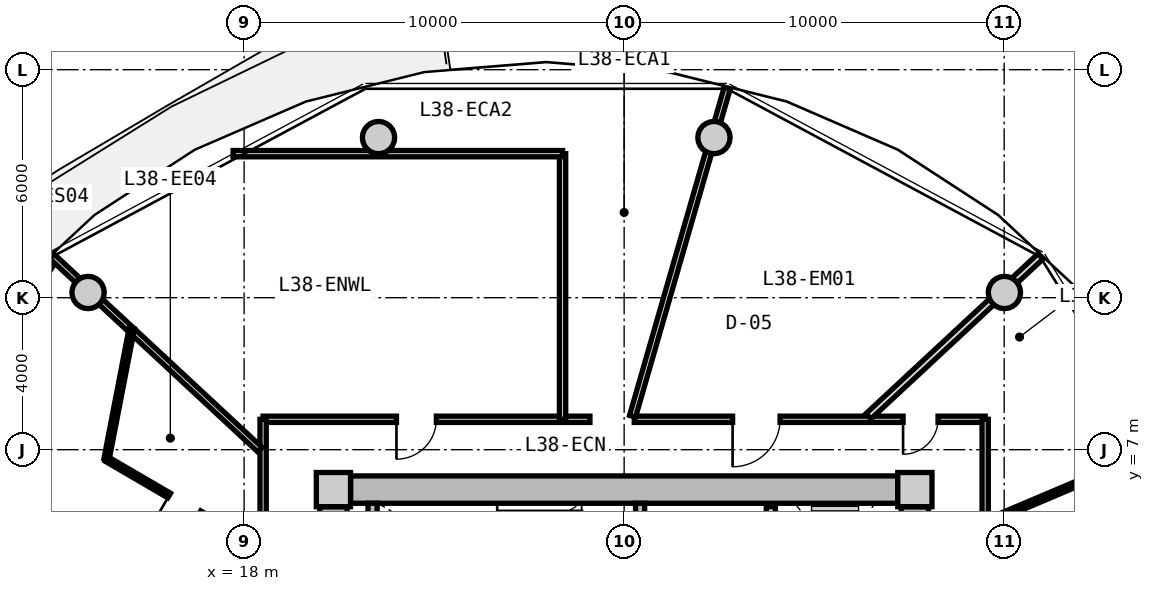
"""IFC4 building model, lengths in metres.
Left out: names, types, materials, properties, quantities, classifications, styles, units other than length and angle.
Written with IfcOpenShell. Run it as: python <this file> out.ifc"""

import sys

from ifc_helpers import new_model, si_unit, direction, frame, frame_2d, origin, origin_2d, place, context, subcontext, project, spatial, rectangle, circle, extrude, source, transform, mapped, element, fill, save


model = new_model("IFC4")
c1 = context("Model", 3, precision=1e-05, world=origin(), true_north=direction((0.0, 1.0)))
c2 = subcontext(c1, "Body", "Model", "MODEL_VIEW")
j1 = project(units=[si_unit("LENGTHUNIT", "METRE"), si_unit("PLANEANGLEUNIT", "RADIAN")], contexts=[c1])
p1 = place(None, origin())
s1 = spatial("IfcSite", under=j1, at=p1, CompositionType="ELEMENT")
p2 = place(p1, origin())
s2 = spatial("IfcBuilding", under=s1, at=p2, CompositionType="ELEMENT")
p3 = place(p2, frame((0.0, 0.0, 123.7)))
s3 = spatial("IfcBuildingStorey", under=s2, at=p3, CompositionType="ELEMENT", Elevation=123.7)
m1 = source(origin(), c2, "Body", "SweptSolid", [
    extrude(rectangle(XDim=0.9, YDim=0.9, at=origin_2d()), origin(), (0.0, 0.0, 1.0), 3.05),
])
for number, where, z_axis, x_axis in (
    (1, (35.65, 5.95, 0.0), (0.0, 0.0, 1.0), (1.0, 0.0, 0.0)),
    (2, (20.35, 5.95, 0.0), (0.0, 0.0, 1.0), (1.0, 0.0, 0.0)),
):
    element("IfcColumn", number, at=place(p3, frame(where, z_axis=z_axis, x_axis=x_axis)), inside=s3, PredefinedType="COLUMN", context=c2, shape_type="MappedRepresentation", body=[
        mapped(m1, transform((0.0, 0.0, 0.0), x_axis=(1.0, 0.0, 0.0), y_axis=(0.0, 1.0, 0.0), z_axis=(0.0, 0.0, 1.0), scale=1.0)),
    ])
m2 = source(origin(), c2, "Body", "SweptSolid", [
    extrude(rectangle(XDim=14.4, YDim=0.72, at=frame_2d((7.2, 0.0))), origin(), (0.0, 0.0, 1.0), 2.79),
])
p4 = place(p3, frame((20.8, 5.95, 0.0), z_axis=(0.0, 0.0, 1.0), x_axis=(1.0, 0.0, 0.0)))
e3 = element("IfcWall", 3, at=p4, inside=s3, PredefinedType="SHEAR", context=c2, shape_type="MappedRepresentation", body=[
    mapped(m2, transform((0.0, 0.0, 0.0), x_axis=(1.0, 0.0, 0.0), y_axis=(0.0, 1.0, 0.0), z_axis=(0.0, 0.0, 1.0), scale=1.0)),
])
m3 = source(origin(), c2, "Body", "SweptSolid", [
    extrude(rectangle(XDim=11.0, YDim=0.72, at=frame_2d((5.5, 0.0))), origin(), (0.0, 0.0, 1.0), 2.79),
])
p5 = place(p3, frame((20.35, -5.5, 0.0), z_axis=(0.0, 0.0, 1.0), x_axis=(0.0, 1.0, 0.0)))
e4 = element("IfcWall", 4, at=p5, inside=s3, PredefinedType="SHEAR", context=c2, shape_type="MappedRepresentation", body=[
    mapped(m3, transform((0.0, 0.0, 0.0), x_axis=(1.0, 0.0, 0.0), y_axis=(0.0, 1.0, 0.0), z_axis=(0.0, 0.0, 1.0), scale=1.0)),
])
p6 = place(p5, frame((3.8, 0.0, 0.0)))
e5 = element("IfcOpeningElement", 5, at=p6, cuts=e4, PredefinedType="OPENING", context=c2, shape_type="SweptSolid", body=[
    extrude(rectangle(XDim=1.2, YDim=2.15, at=frame_2d((0.6, 1.075))), frame((0.0, 0.37, 0.0), z_axis=(0.0, -1.0, 0.0), x_axis=(1.0, 0.0, 0.0)), (0.0, 0.0, 1.0), 0.74),
])
p7 = place(p3, frame((35.65, 5.5, 0.0), z_axis=(0.0, 0.0, 1.0), x_axis=(0.0, -1.0, 0.0)))
e6 = element("IfcWall", 6, at=p7, inside=s3, PredefinedType="SHEAR", context=c2, shape_type="MappedRepresentation", body=[
    mapped(m3, transform((0.0, 0.0, 0.0), x_axis=(1.0, 0.0, 0.0), y_axis=(0.0, 1.0, 0.0), z_axis=(0.0, 0.0, 1.0), scale=1.0)),
])
p8 = place(p7, frame((5.65, 0.0, 0.0)))
e7 = element("IfcOpeningElement", 7, at=p8, cuts=e6, PredefinedType="OPENING", context=c2, shape_type="SweptSolid", body=[
    extrude(rectangle(XDim=1.2, YDim=2.15, at=frame_2d((0.6, 1.075))), frame((0.0, 0.37, 0.0), z_axis=(0.0, -1.0, 0.0), x_axis=(1.0, 0.0, 0.0)), (0.0, 0.0, 1.0), 0.74),
])
m4 = source(origin(), c2, "Body", "SweptSolid", [
    extrude(circle(Radius=0.425, at=origin_2d()), origin(), (0.0, 0.0, 1.0), 3.05),
])
for number, where, z_axis, x_axis in (
    (8, (38.006, 11.137, 0.0), (0.0, 0.0, 1.0), (1.0, 0.0, 0.0)),
    (9, (30.363, 15.213, 0.0), (0.0, 0.0, 1.0), (1.0, 0.0, 0.0)),
    (10, (21.537, 15.213, 0.0), (0.0, 0.0, 1.0), (1.0, 0.0, 0.0)),
    (11, (13.894, 11.137, 0.0), (0.0, 0.0, 1.0), (1.0, 0.0, 0.0)),
):
    element("IfcColumn", number, at=place(p3, frame(where, z_axis=z_axis, x_axis=x_axis)), inside=s3, PredefinedType="COLUMN", context=c2, shape_type="MappedRepresentation", body=[
        mapped(m4, transform((0.0, 0.0, 0.0), x_axis=(1.0, 0.0, 0.0), y_axis=(0.0, 1.0, 0.0), z_axis=(0.0, 0.0, 1.0), scale=1.0)),
    ])
m5 = source(origin(), c2, "Body", "SweptSolid", [
    extrude(rectangle(XDim=9.014, YDim=0.29, at=frame_2d((4.507, 0.0))), origin(), (0.0, 0.0, 1.0), 2.79),
])
p9 = place(p3, frame((8.196, 4.421, 0.0), z_axis=(0.0, 0.0, 1.0), x_axis=(0.527732945084, 0.849410347637, 0.0)))
e12 = element("IfcWall", 12, at=p9, inside=s3, PredefinedType="SOLIDWALL", context=c2, shape_type="MappedRepresentation", body=[
    mapped(m5, transform((0.0, 0.0, 0.0), x_axis=(1.0, 0.0, 0.0), y_axis=(0.0, 1.0, 0.0), z_axis=(0.0, 0.0, 1.0), scale=1.0)),
])
p10 = place(p9, frame((0.98, 0.0, 0.0)))
e13 = element("IfcOpeningElement", 13, at=p10, cuts=e12, PredefinedType="OPENING", context=c2, shape_type="SweptSolid", body=[
    extrude(rectangle(XDim=1.15, YDim=2.25, at=frame_2d((0.575, 1.125))), frame((0.0, 0.155, 0.0), z_axis=(0.0, -1.0, 0.0), x_axis=(1.0, 0.0, 0.0)), (0.0, 0.0, 1.0), 0.31),
])
p11 = place(p9, frame((4.857, 0.0, 0.85)))
e14 = element("IfcOpeningElement", 14, at=p11, cuts=e12, PredefinedType="OPENING", context=c2, shape_type="SweptSolid", body=[
    extrude(rectangle(XDim=1.2, YDim=1.5, at=frame_2d((0.6, 0.75))), frame((0.0, 0.155, 0.0), z_axis=(0.0, -1.0, 0.0), x_axis=(1.0, 0.0, 0.0)), (0.0, 0.0, 1.0), 0.31),
])
m6 = source(origin(), c2, "Body", "SweptSolid", [
    extrude(rectangle(XDim=3.14, YDim=0.24, at=frame_2d((1.57, 0.0))), origin(), (0.0, 0.0, 1.0), 2.79),
])
p12 = place(p3, frame((21.38, 2.45, 0.0), z_axis=(0.0, 0.0, 1.0), x_axis=(0.0, 1.0, 0.0)))
e15 = element("IfcWall", 15, at=p12, inside=s3, PredefinedType="PARTITIONING", context=c2, shape_type="MappedRepresentation", body=[
    mapped(m6, transform((0.0, 0.0, 0.0), x_axis=(1.0, 0.0, 0.0), y_axis=(0.0, 1.0, 0.0), z_axis=(0.0, 0.0, 1.0), scale=1.0)),
])
p13 = place(p3, frame((28.42, 2.45, 0.0), z_axis=(0.0, 0.0, 1.0), x_axis=(0.0, 1.0, 0.0)))
e16 = element("IfcWall", 16, at=p13, inside=s3, PredefinedType="PARTITIONING", context=c2, shape_type="MappedRepresentation", body=[
    mapped(m6, transform((0.0, 0.0, 0.0), x_axis=(1.0, 0.0, 0.0), y_axis=(0.0, 1.0, 0.0), z_axis=(0.0, 0.0, 1.0), scale=1.0)),
])
p14 = place(p13, frame((0.55, 0.0, 0.0)))
e17 = element("IfcOpeningElement", 17, at=p14, cuts=e16, PredefinedType="OPENING", context=c2, shape_type="SweptSolid", body=[
    extrude(rectangle(XDim=1.1, YDim=2.15, at=frame_2d((0.55, 1.075))), frame((0.0, 0.13, 0.0), z_axis=(0.0, -1.0, 0.0), x_axis=(1.0, 0.0, 0.0)), (0.0, 0.0, 1.0), 0.26),
])
m7 = source(origin(), c2, "Body", "SweptSolid", [
    extrude(rectangle(XDim=5.0, YDim=0.24, at=frame_2d((2.5, 0.0))), origin(), (0.0, 0.0, 1.0), 2.775),
])
p15 = place(p3, frame((31.86, 0.5, 0.0), z_axis=(0.0, 0.0, 1.0), x_axis=(0.0, 1.0, 0.0)))
e18 = element("IfcWall", 18, at=p15, inside=s3, PredefinedType="PARTITIONING", context=c2, shape_type="MappedRepresentation", body=[
    mapped(m7, transform((0.0, 0.0, 0.0), x_axis=(1.0, 0.0, 0.0), y_axis=(0.0, 1.0, 0.0), z_axis=(0.0, 0.0, 1.0), scale=1.0)),
])
p16 = place(p15, frame((3.05, 0.0, 0.0)))
e19 = element("IfcOpeningElement", 19, at=p16, cuts=e18, PredefinedType="OPENING", context=c2, shape_type="SweptSolid", body=[
    extrude(rectangle(XDim=1.3, YDim=2.2, at=frame_2d((0.65, 1.1))), frame((0.0, 0.13, 0.0), z_axis=(0.0, -1.0, 0.0), x_axis=(1.0, 0.0, 0.0)), (0.0, 0.0, 1.0), 0.26),
])
p17 = place(p15, frame((0.55, 0.0, 0.0)))
e20 = element("IfcOpeningElement", 20, at=p17, cuts=e18, PredefinedType="OPENING", context=c2, shape_type="SweptSolid", body=[
    extrude(rectangle(XDim=1.3, YDim=2.2, at=frame_2d((0.65, 1.1))), frame((0.0, 0.13, 0.0), z_axis=(0.0, -1.0, 0.0), x_axis=(1.0, 0.0, 0.0)), (0.0, 0.0, 1.0), 0.26),
])
m8 = source(origin(), c2, "Body", "SweptSolid", [
    extrude(rectangle(XDim=8.6, YDim=0.165, at=frame_2d((4.3, 0.0))), origin(), (0.0, 0.0, 1.0), 2.775),
])
p18 = place(p3, frame((18.5, 7.8, 0.0), z_axis=(0.0, 0.0, 1.0), x_axis=(1.0, 0.0, 0.0)))
e21 = element("IfcWall", 21, at=p18, inside=s3, PredefinedType="PARTITIONING", context=c2, shape_type="MappedRepresentation", body=[
    mapped(m8, transform((0.0, 0.0, 0.0), x_axis=(1.0, 0.0, 0.0), y_axis=(0.0, 1.0, 0.0), z_axis=(0.0, 0.0, 1.0), scale=1.0)),
])
p19 = place(p18, frame((3.509, 0.0, 0.0)))
e22 = element("IfcOpeningElement", 22, at=p19, cuts=e21, PredefinedType="OPENING", context=c2, shape_type="SweptSolid", body=[
    extrude(rectangle(XDim=1.05, YDim=2.15, at=frame_2d((0.525, 1.075))), frame((0.0, 0.093, 0.0), z_axis=(0.0, -1.0, 0.0), x_axis=(1.0, 0.0, 0.0)), (0.0, 0.0, 1.0), 0.185),
])
m9 = source(origin(), c2, "Body", "SweptSolid", [
    extrude(rectangle(XDim=9.234, YDim=0.165, at=frame_2d((4.617, 0.0))), origin(), (0.0, 0.0, 1.0), 2.775),
])
p20 = place(p3, frame((28.266, 7.8, 0.0), z_axis=(0.0, 0.0, 1.0), x_axis=(1.0, 0.0, 0.0)))
e23 = element("IfcWall", 23, at=p20, inside=s3, PredefinedType="PARTITIONING", context=c2, shape_type="MappedRepresentation", body=[
    mapped(m9, transform((0.0, 0.0, 0.0), x_axis=(1.0, 0.0, 0.0), y_axis=(0.0, 1.0, 0.0), z_axis=(0.0, 0.0, 1.0), scale=1.0)),
])
p21 = place(p20, frame((7.074, 0.0, 0.0)))
e24 = element("IfcOpeningElement", 24, at=p21, cuts=e23, PredefinedType="OPENING", context=c2, shape_type="SweptSolid", body=[
    extrude(rectangle(XDim=0.92, YDim=2.1, at=frame_2d((0.46, 1.05))), frame((0.0, 0.093, 0.0), z_axis=(0.0, -1.0, 0.0), x_axis=(1.0, 0.0, 0.0)), (0.0, 0.0, 1.0), 0.185),
])
p22 = place(p20, frame((2.588, 0.0, 0.0)))
e25 = element("IfcOpeningElement", 25, at=p22, cuts=e23, PredefinedType="OPENING", context=c2, shape_type="SweptSolid", body=[
    extrude(rectangle(XDim=1.25, YDim=2.2, at=frame_2d((0.625, 1.1))), frame((0.0, 0.093, 0.0), z_axis=(0.0, -1.0, 0.0), x_axis=(1.0, 0.0, 0.0)), (0.0, 0.0, 1.0), 0.185),
])
m10 = source(origin(), c2, "Body", "SweptSolid", [
    extrude(rectangle(XDim=15.6, YDim=0.165, at=frame_2d((7.8, 0.0))), origin(), (0.0, 0.0, 1.0), 2.775),
])
p23 = place(p3, frame((18.5, -7.8, 0.0), z_axis=(0.0, 0.0, 1.0), x_axis=(0.0, 1.0, 0.0)))
e26 = element("IfcWall", 26, at=p23, inside=s3, PredefinedType="PARTITIONING", context=c2, shape_type="MappedRepresentation", body=[
    mapped(m10, transform((0.0, 0.0, 0.0), x_axis=(1.0, 0.0, 0.0), y_axis=(0.0, 1.0, 0.0), z_axis=(0.0, 0.0, 1.0), scale=1.0)),
])
p24 = place(p23, frame((10.383, 0.0, 0.0)))
e27 = element("IfcOpeningElement", 27, at=p24, cuts=e26, PredefinedType="OPENING", context=c2, shape_type="SweptSolid", body=[
    extrude(rectangle(XDim=1.05, YDim=2.15, at=frame_2d((0.525, 1.075))), frame((0.0, 0.093, 0.0), z_axis=(0.0, -1.0, 0.0), x_axis=(1.0, 0.0, 0.0)), (0.0, 0.0, 1.0), 0.185),
])
p25 = place(p23, frame((6.419, 0.0, 0.0)))
e28 = element("IfcOpeningElement", 28, at=p25, cuts=e26, PredefinedType="OPENING", context=c2, shape_type="SweptSolid", body=[
    extrude(rectangle(XDim=1.05, YDim=2.15, at=frame_2d((0.525, 1.075))), frame((0.0, 0.093, 0.0), z_axis=(0.0, -1.0, 0.0), x_axis=(1.0, 0.0, 0.0)), (0.0, 0.0, 1.0), 0.185),
])
p26 = place(p3, frame((37.5, 7.8, 0.0), z_axis=(0.0, 0.0, 1.0), x_axis=(0.0, -1.0, 0.0)))
e29 = element("IfcWall", 29, at=p26, inside=s3, PredefinedType="PARTITIONING", context=c2, shape_type="MappedRepresentation", body=[
    mapped(m10, transform((0.0, 0.0, 0.0), x_axis=(1.0, 0.0, 0.0), y_axis=(0.0, 1.0, 0.0), z_axis=(0.0, 0.0, 1.0), scale=1.0)),
])
p27 = place(p26, frame((12.094, 0.0, 0.0)))
e30 = element("IfcOpeningElement", 30, at=p27, cuts=e29, PredefinedType="OPENING", context=c2, shape_type="SweptSolid", body=[
    extrude(rectangle(XDim=1.05, YDim=2.15, at=frame_2d((0.525, 1.075))), frame((0.0, 0.093, 0.0), z_axis=(0.0, -1.0, 0.0), x_axis=(1.0, 0.0, 0.0)), (0.0, 0.0, 1.0), 0.185),
])
p28 = place(p26, frame((5.971, 0.0, 0.0)))
e31 = element("IfcOpeningElement", 31, at=p28, cuts=e29, PredefinedType="OPENING", context=c2, shape_type="SweptSolid", body=[
    extrude(rectangle(XDim=1.05, YDim=2.15, at=frame_2d((0.525, 1.075))), frame((0.0, 0.093, 0.0), z_axis=(0.0, -1.0, 0.0), x_axis=(1.0, 0.0, 0.0)), (0.0, 0.0, 1.0), 0.185),
])
p29 = place(p26, frame((3.324, 0.0, 0.0)))
e32 = element("IfcOpeningElement", 32, at=p29, cuts=e29, PredefinedType="OPENING", context=c2, shape_type="SweptSolid", body=[
    extrude(rectangle(XDim=0.92, YDim=2.1, at=frame_2d((0.46, 1.05))), frame((0.0, 0.093, 0.0), z_axis=(0.0, -1.0, 0.0), x_axis=(1.0, 0.0, 0.0)), (0.0, 0.0, 1.0), 0.185),
])
m11 = source(origin(), c2, "Body", "SweptSolid", [
    extrude(rectangle(XDim=8.989, YDim=0.165, at=frame_2d((4.495, 0.0))), origin(), (0.0, 0.0, 1.0), 2.275),
])
p30 = place(p3, frame((28.222, 7.88, 0.0), z_axis=(0.0, 0.0, 1.0), x_axis=(0.27702323008, 0.960863221274, 0.0)))
e33 = element("IfcWall", 33, at=p30, inside=s3, PredefinedType="PARTITIONING", context=c2, shape_type="MappedRepresentation", body=[
    mapped(m11, transform((0.0, 0.0, 0.0), x_axis=(1.0, 0.0, 0.0), y_axis=(0.0, 1.0, 0.0), z_axis=(0.0, 0.0, 1.0), scale=1.0)),
])
m12 = source(origin(), c2, "Body", "SweptSolid", [
    extrude(rectangle(XDim=7.482, YDim=0.165, at=frame_2d((3.741, 0.0))), origin(), (0.0, 0.0, 1.0), 2.275),
])
p31 = place(p3, frame((18.42, 6.998, 0.0), z_axis=(0.0, 0.0, 1.0), x_axis=(-0.732508698043, 0.680757671489, 0.0)))
e34 = element("IfcWall", 34, at=p31, inside=s3, PredefinedType="PARTITIONING", context=c2, shape_type="MappedRepresentation", body=[
    mapped(m12, transform((0.0, 0.0, 0.0), x_axis=(1.0, 0.0, 0.0), y_axis=(0.0, 1.0, 0.0), z_axis=(0.0, 0.0, 1.0), scale=1.0)),
])
m13 = source(origin(), c2, "Body", "SweptSolid", [
    extrude(rectangle(XDim=6.99, YDim=0.165, at=frame_2d((3.495, 0.0))), origin(), (0.0, 0.0, 1.0), 2.775),
])
p32 = place(p3, frame((26.38, 7.8, 0.0), z_axis=(0.0, 0.0, 1.0), x_axis=(0.0, 1.0, 0.0)))
e35 = element("IfcWall", 35, at=p32, inside=s3, PredefinedType="PARTITIONING", context=c2, shape_type="MappedRepresentation", body=[
    mapped(m13, transform((0.0, 0.0, 0.0), x_axis=(1.0, 0.0, 0.0), y_axis=(0.0, 1.0, 0.0), z_axis=(0.0, 0.0, 1.0), scale=1.0)),
])
m14 = source(origin(), c2, "Body", "SweptSolid", [
    extrude(rectangle(XDim=8.669, YDim=0.165, at=frame_2d((4.335, 0.0))), origin(), (0.0, 0.0, 1.0), 2.775),
])
p33 = place(p3, frame((17.71, 14.79, 0.0), z_axis=(0.0, 0.0, 1.0), x_axis=(1.0, 0.0, 0.0)))
e36 = element("IfcWall", 36, at=p33, inside=s3, PredefinedType="PARTITIONING", context=c2, shape_type="MappedRepresentation", body=[
    mapped(m14, transform((0.0, 0.0, 0.0), x_axis=(1.0, 0.0, 0.0), y_axis=(0.0, 1.0, 0.0), z_axis=(0.0, 0.0, 1.0), scale=1.0)),
])
m15 = source(origin(), c2, "Body", "SweptSolid", [
    extrude(rectangle(XDim=4.735, YDim=0.14, at=frame_2d((2.368, 0.0))), origin(), (0.0, 0.0, 1.0), 2.775),
])
p34 = place(p3, frame((18.47, 4.368, 0.0), z_axis=(0.0, 0.0, 1.0), x_axis=(-0.863537576642, 0.504284496814, 0.0)))
e37 = element("IfcWall", 37, at=p34, inside=s3, PredefinedType="PARTITIONING", context=c2, shape_type="MappedRepresentation", body=[
    mapped(m15, transform((0.0, 0.0, 0.0), x_axis=(1.0, 0.0, 0.0), y_axis=(0.0, 1.0, 0.0), z_axis=(0.0, 0.0, 1.0), scale=1.0)),
])
p35 = place(p34, frame((1.908, 0.0, 0.0)))
e38 = element("IfcOpeningElement", 38, at=p35, cuts=e37, PredefinedType="OPENING", context=c2, shape_type="SweptSolid", body=[
    extrude(rectangle(XDim=0.92, YDim=2.1, at=frame_2d((0.46, 1.05))), frame((0.0, 0.08, 0.0), z_axis=(0.0, -1.0, 0.0), x_axis=(1.0, 0.0, 0.0)), (0.0, 0.0, 1.0), 0.16),
])
m16 = source(origin(), c2, "Body", "SweptSolid", [
    extrude(rectangle(XDim=3.499, YDim=0.14, at=frame_2d((1.75, 0.0))), origin(), (0.0, 0.0, 1.0), 2.775),
])
p36 = place(p3, frame((14.381, 6.756, 0.0), z_axis=(0.0, 0.0, 1.0), x_axis=(0.18957713629, 0.981865830649, 0.0)))
e39 = element("IfcWall", 39, at=p36, inside=s3, PredefinedType="PARTITIONING", context=c2, shape_type="MappedRepresentation", body=[
    mapped(m16, transform((0.0, 0.0, 0.0), x_axis=(1.0, 0.0, 0.0), y_axis=(0.0, 1.0, 0.0), z_axis=(0.0, 0.0, 1.0), scale=1.0)),
])
m17 = source(origin(), c2, "Body", "SweptSolid", [
    extrude(rectangle(XDim=6.187, YDim=0.19, at=frame_2d((3.093, 0.0))), origin(), (0.0, 0.0, 1.0), 2.275),
])
p37 = place(p3, frame((34.429, 7.88, 0.0), z_axis=(0.0, 0.0, 1.0), x_axis=(0.732501077882, 0.680765870841, 0.0)))
e40 = element("IfcWall", 40, at=p37, inside=s3, PredefinedType="PARTITIONING", context=c2, shape_type="MappedRepresentation", body=[
    mapped(m17, transform((0.0, 0.0, 0.0), x_axis=(1.0, 0.0, 0.0), y_axis=(0.0, 1.0, 0.0), z_axis=(0.0, 0.0, 1.0), scale=1.0)),
])
m18 = source(origin(), c2, "Body", "SweptSolid", [
    extrude(rectangle(XDim=4.968, YDim=0.14, at=frame_2d((2.484, 0.0))), origin(), (0.0, 0.0, 1.0), 2.775),
])
p38 = place(p3, frame((37.53, 5.092, 0.0), z_axis=(0.0, 0.0, 1.0), x_axis=(0.920595165864, 0.39051829738, 0.0)))
e41 = element("IfcWall", 41, at=p38, inside=s3, PredefinedType="PARTITIONING", context=c2, shape_type="MappedRepresentation", body=[
    mapped(m18, transform((0.0, 0.0, 0.0), x_axis=(1.0, 0.0, 0.0), y_axis=(0.0, 1.0, 0.0), z_axis=(0.0, 0.0, 1.0), scale=1.0)),
])
m19 = source(origin(), c2, "Body", "SweptSolid", [
    extrude(rectangle(XDim=1.05, YDim=2.15, at=frame_2d((0.525, 1.075))), frame((0.0, 0.025, 0.0), z_axis=(0.0, -1.0, 0.0), x_axis=(1.0, 0.0, 0.0)), (0.0, 0.0, 1.0), 0.05),
])
p39 = place(p19, frame((1.05, 0.0, 0.0), z_axis=(0.0, 0.0, 1.0), x_axis=(-1.0, 0.0, 0.0)))
e42 = element("IfcDoor", 42, at=p39, inside=s3, OperationType="SINGLE_SWING_RIGHT", PredefinedType="DOOR", context=c2, shape_type="MappedRepresentation", body=[
    mapped(m19, transform((0.0, 0.0, 0.0), x_axis=(1.0, 0.0, 0.0), y_axis=(0.0, 1.0, 0.0), z_axis=(0.0, 0.0, 1.0), scale=1.0)),
])
fill(e22, e42)
m20 = source(origin(), c2, "Body", "SweptSolid", [
    extrude(rectangle(XDim=0.92, YDim=2.1, at=frame_2d((0.46, 1.05))), frame((0.0, 0.025, 0.0), z_axis=(0.0, -1.0, 0.0), x_axis=(1.0, 0.0, 0.0)), (0.0, 0.0, 1.0), 0.05),
])
p40 = place(p35, origin())
e43 = element("IfcDoor", 43, at=p40, inside=s3, OperationType="SINGLE_SWING_RIGHT", PredefinedType="DOOR", context=c2, shape_type="MappedRepresentation", body=[
    mapped(m20, transform((0.0, 0.0, 0.0), x_axis=(1.0, 0.0, 0.0), y_axis=(0.0, 1.0, 0.0), z_axis=(0.0, 0.0, 1.0), scale=1.0)),
])
fill(e38, e43)
p41 = place(p21, frame((0.92, 0.0, 0.0), z_axis=(0.0, 0.0, 1.0), x_axis=(-1.0, 0.0, 0.0)))
e44 = element("IfcDoor", 44, at=p41, inside=s3, OperationType="SINGLE_SWING_RIGHT", PredefinedType="DOOR", context=c2, shape_type="MappedRepresentation", body=[
    mapped(m20, transform((0.0, 0.0, 0.0), x_axis=(1.0, 0.0, 0.0), y_axis=(0.0, 1.0, 0.0), z_axis=(0.0, 0.0, 1.0), scale=1.0)),
])
fill(e24, e44)
m21 = source(origin(), c2, "Body", "SweptSolid", [
    extrude(rectangle(XDim=1.25, YDim=2.2, at=frame_2d((0.625, 1.1))), frame((0.0, 0.025, 0.0), z_axis=(0.0, -1.0, 0.0), x_axis=(1.0, 0.0, 0.0)), (0.0, 0.0, 1.0), 0.05),
])
p42 = place(p22, frame((1.25, 0.0, 0.0), z_axis=(0.0, 0.0, 1.0), x_axis=(-1.0, 0.0, 0.0)))
e45 = element("IfcDoor", 45, at=p42, inside=s3, OperationType="SINGLE_SWING_RIGHT", PredefinedType="DOOR", context=c2, shape_type="MappedRepresentation", body=[
    mapped(m21, transform((0.0, 0.0, 0.0), x_axis=(1.0, 0.0, 0.0), y_axis=(0.0, 1.0, 0.0), z_axis=(0.0, 0.0, 1.0), scale=1.0)),
])
fill(e25, e45)
save(model, sys.argv[1])
